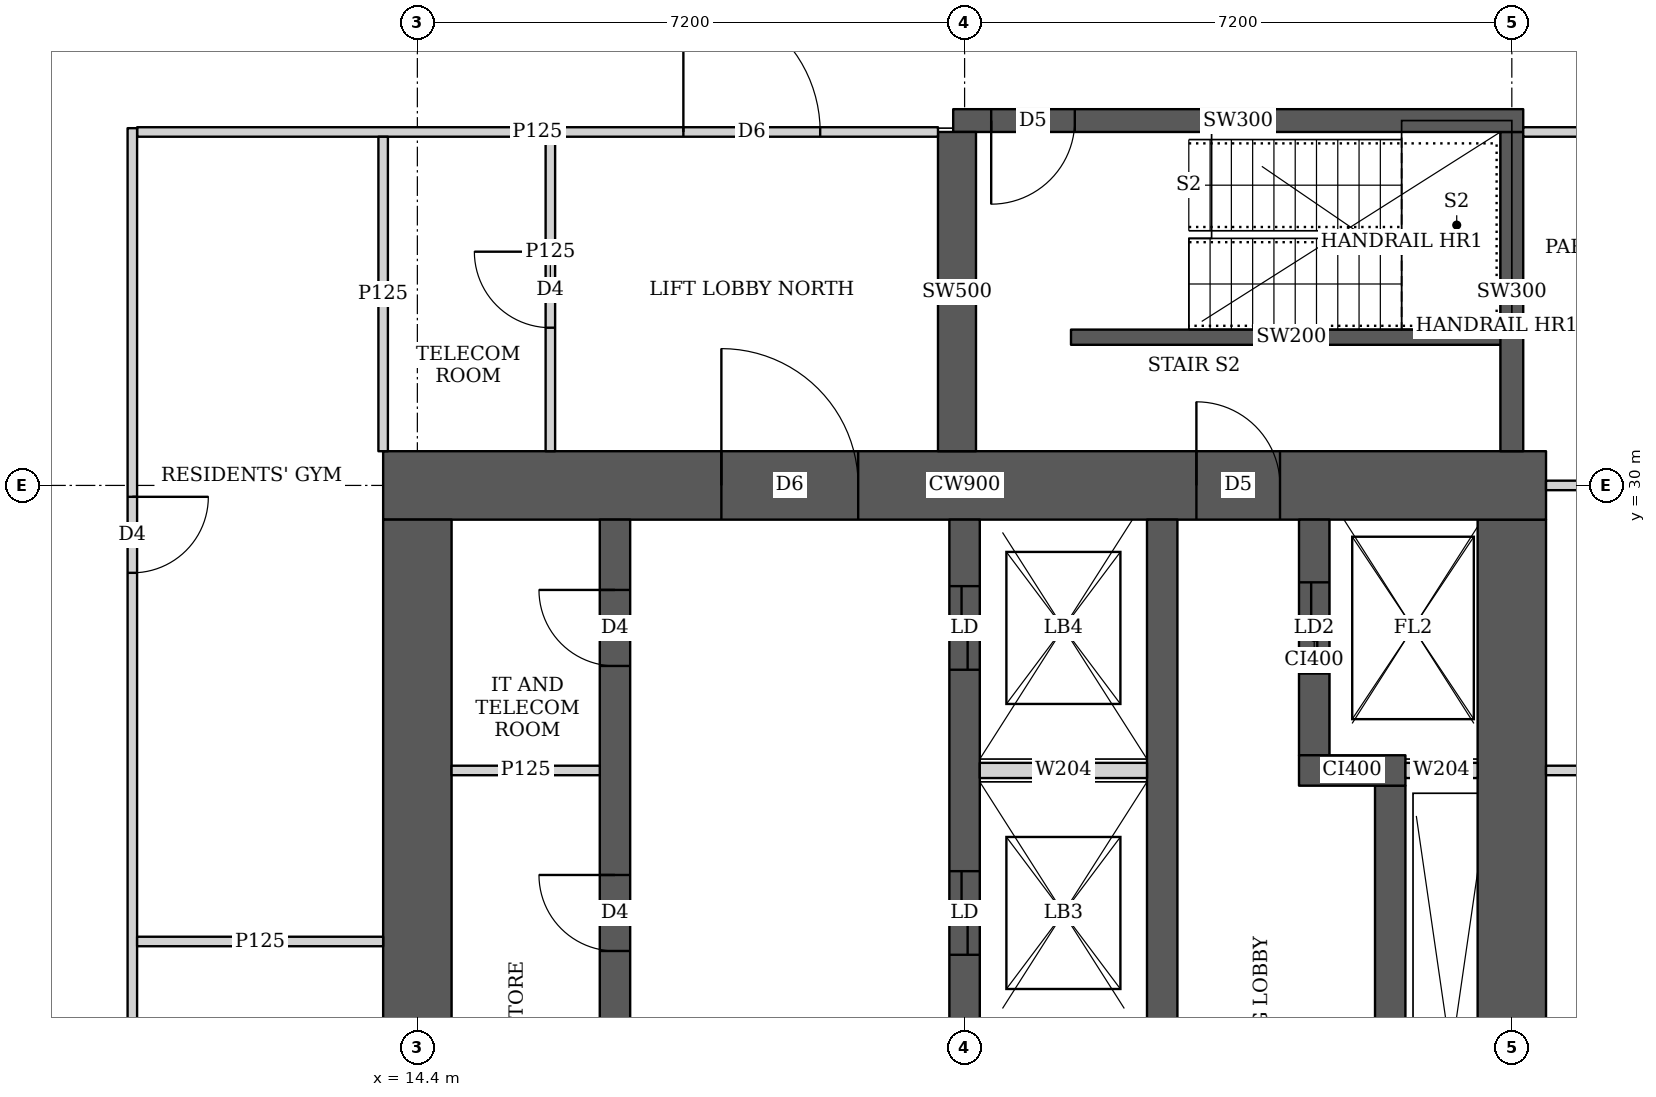
"""IFC4 building model, lengths in metres.
Left out: names, types, materials, properties, quantities, classifications, styles, units other than length and angle.
Written with IfcOpenShell. Run it as: python <this file> out.ifc"""

import sys

from ifc_helpers import new_model, si_unit, direction, frame, frame_2d, origin, place, context, subcontext, project, spatial, rectangle, extrude, element, fill, save


model = new_model("IFC4")
c1 = context("Model", 3, precision=1e-05, world=origin(), true_north=direction((0.0, 1.0)))
c2 = subcontext(c1, "Body", "Model", "MODEL_VIEW")
j1 = project(units=[si_unit("LENGTHUNIT", "METRE"), si_unit("PLANEANGLEUNIT", "RADIAN")], contexts=[c1])
p1 = place(None, origin())
s1 = spatial("IfcSite", under=j1, at=p1, CompositionType="ELEMENT")
p2 = place(p1, origin())
s2 = spatial("IfcBuilding", under=s1, at=p2, CompositionType="ELEMENT")
p3 = place(p2, frame((0.0, 0.0, 208.7)))
s3 = spatial("IfcBuildingStorey", under=s2, at=p3, CompositionType="ELEMENT", Elevation=208.7)
p4 = place(p3, frame((13.95, 30.0, 0.0), z_axis=(0.0, 0.0, 1.0), x_axis=(1.0, 0.0, 0.0)))
e1 = element("IfcWall", 1, at=p4, inside=s3, PredefinedType="SHEAR", context=c2, shape_type="SweptSolid", body=[
    extrude(rectangle(XDim=15.3, YDim=0.9, at=frame_2d((7.65, 0.0))), origin(), (0.0, 0.0, 1.0), 3.75),
])
p5 = place(p4, frame((4.45, 0.0, 0.0)))
e2 = element("IfcOpeningElement", 2, at=p5, cuts=e1, PredefinedType="OPENING", context=c2, shape_type="SweptSolid", body=[
    extrude(rectangle(XDim=1.8, YDim=2.1, at=frame_2d((0.9, 1.05))), frame((0.0, 0.46, 0.0), z_axis=(0.0, -1.0, 0.0), x_axis=(1.0, 0.0, 0.0)), (0.0, 0.0, 1.0), 0.92),
])
p6 = place(p4, frame((10.7, 0.0, 0.0)))
e3 = element("IfcOpeningElement", 3, at=p6, cuts=e1, PredefinedType="OPENING", context=c2, shape_type="SweptSolid", body=[
    extrude(rectangle(XDim=1.1, YDim=2.1, at=frame_2d((0.55, 1.05))), frame((0.0, 0.46, 0.0), z_axis=(0.0, -1.0, 0.0), x_axis=(1.0, 0.0, 0.0)), (0.0, 0.0, 1.0), 0.92),
])
for number, where, z_axis, x_axis in (
    (4, (14.4, 15.45, 0.0), (0.0, 0.0, 1.0), (0.0, 1.0, 0.0)),
    (5, (28.8, 15.45, 0.0), (0.0, 0.0, 1.0), (0.0, 1.0, 0.0)),
):
    element("IfcWall", number, at=place(p3, frame(where, z_axis=z_axis, x_axis=x_axis)), inside=s3, PredefinedType="SHEAR", context=c2, shape_type="SweptSolid", body=[
        extrude(rectangle(XDim=14.1, YDim=0.9, at=frame_2d((7.05, 0.0))), origin(), (0.0, 0.0, 1.0), 3.75),
    ])
p7 = place(p3, frame((17.0, 15.45, 0.0), z_axis=(0.0, 0.0, 1.0), x_axis=(0.0, 1.0, 0.0)))
e6 = element("IfcWall", 6, at=p7, inside=s3, PredefinedType="SHEAR", context=c2, shape_type="SweptSolid", body=[
    extrude(rectangle(XDim=14.1, YDim=0.4, at=frame_2d((7.05, 0.0))), origin(), (0.0, 0.0, 1.0), 3.75),
])
p8 = place(p7, frame((0.925, 0.0, 0.0)))
e7 = element("IfcOpeningElement", 7, at=p8, cuts=e6, PredefinedType="OPENING", context=c2, shape_type="SweptSolid", body=[
    extrude(rectangle(XDim=1.0, YDim=2.1, at=frame_2d((0.5, 1.05))), frame((0.0, 0.21, 0.0), z_axis=(0.0, -1.0, 0.0), x_axis=(1.0, 0.0, 0.0)), (0.0, 0.0, 1.0), 0.42),
])
p9 = place(p7, frame((4.675, 0.0, 0.0)))
e8 = element("IfcOpeningElement", 8, at=p9, cuts=e6, PredefinedType="OPENING", context=c2, shape_type="SweptSolid", body=[
    extrude(rectangle(XDim=1.0, YDim=2.1, at=frame_2d((0.5, 1.05))), frame((0.0, 0.21, 0.0), z_axis=(0.0, -1.0, 0.0), x_axis=(1.0, 0.0, 0.0)), (0.0, 0.0, 1.0), 0.42),
])
p10 = place(p7, frame((8.425, 0.0, 0.0)))
e9 = element("IfcOpeningElement", 9, at=p10, cuts=e6, PredefinedType="OPENING", context=c2, shape_type="SweptSolid", body=[
    extrude(rectangle(XDim=1.0, YDim=2.1, at=frame_2d((0.5, 1.05))), frame((0.0, 0.21, 0.0), z_axis=(0.0, -1.0, 0.0), x_axis=(1.0, 0.0, 0.0)), (0.0, 0.0, 1.0), 0.42),
])
p11 = place(p7, frame((12.175, 0.0, 0.0)))
e10 = element("IfcOpeningElement", 10, at=p11, cuts=e6, PredefinedType="OPENING", context=c2, shape_type="SweptSolid", body=[
    extrude(rectangle(XDim=1.0, YDim=2.1, at=frame_2d((0.5, 1.05))), frame((0.0, 0.21, 0.0), z_axis=(0.0, -1.0, 0.0), x_axis=(1.0, 0.0, 0.0)), (0.0, 0.0, 1.0), 0.42),
])
p12 = place(p3, frame((21.6, 15.45, 0.0), z_axis=(0.0, 0.0, 1.0), x_axis=(0.0, 1.0, 0.0)))
e11 = element("IfcWall", 11, at=p12, inside=s3, PredefinedType="SHEAR", context=c2, shape_type="SweptSolid", body=[
    extrude(rectangle(XDim=14.1, YDim=0.4, at=frame_2d((7.05, 0.0))), origin(), (0.0, 0.0, 1.0), 3.75),
])
p13 = place(p12, frame((0.875, 0.0, 0.0)))
e12 = element("IfcOpeningElement", 12, at=p13, cuts=e11, PredefinedType="OPENING", context=c2, shape_type="SweptSolid", body=[
    extrude(rectangle(XDim=1.1, YDim=2.1, at=frame_2d((0.55, 1.05))), frame((0.0, 0.21, 0.0), z_axis=(0.0, -1.0, 0.0), x_axis=(1.0, 0.0, 0.0)), (0.0, 0.0, 1.0), 0.42),
])
p14 = place(p12, frame((4.625, 0.0, 0.0)))
e13 = element("IfcOpeningElement", 13, at=p14, cuts=e11, PredefinedType="OPENING", context=c2, shape_type="SweptSolid", body=[
    extrude(rectangle(XDim=1.1, YDim=2.1, at=frame_2d((0.55, 1.05))), frame((0.0, 0.21, 0.0), z_axis=(0.0, -1.0, 0.0), x_axis=(1.0, 0.0, 0.0)), (0.0, 0.0, 1.0), 0.42),
])
p15 = place(p12, frame((8.375, 0.0, 0.0)))
e14 = element("IfcOpeningElement", 14, at=p15, cuts=e11, PredefinedType="OPENING", context=c2, shape_type="SweptSolid", body=[
    extrude(rectangle(XDim=1.1, YDim=2.1, at=frame_2d((0.55, 1.05))), frame((0.0, 0.21, 0.0), z_axis=(0.0, -1.0, 0.0), x_axis=(1.0, 0.0, 0.0)), (0.0, 0.0, 1.0), 0.42),
])
p16 = place(p12, frame((12.125, 0.0, 0.0)))
e15 = element("IfcOpeningElement", 15, at=p16, cuts=e11, PredefinedType="OPENING", context=c2, shape_type="SweptSolid", body=[
    extrude(rectangle(XDim=1.1, YDim=2.1, at=frame_2d((0.55, 1.05))), frame((0.0, 0.21, 0.0), z_axis=(0.0, -1.0, 0.0), x_axis=(1.0, 0.0, 0.0)), (0.0, 0.0, 1.0), 0.42),
])
p17 = place(p3, frame((24.2, 15.45, 0.0), z_axis=(0.0, 0.0, 1.0), x_axis=(0.0, 1.0, 0.0)))
e16 = element("IfcWall", 16, at=p17, inside=s3, PredefinedType="SHEAR", context=c2, shape_type="SweptSolid", body=[
    extrude(rectangle(XDim=14.1, YDim=0.4, at=frame_2d((7.05, 0.0))), origin(), (0.0, 0.0, 1.0), 3.75),
])
p18 = place(p3, frame((27.2, 18.95, 0.0), z_axis=(0.0, 0.0, 1.0), x_axis=(0.0, 1.0, 0.0)))
e17 = element("IfcWall", 17, at=p18, inside=s3, PredefinedType="SHEAR", context=c2, shape_type="SweptSolid", body=[
    extrude(rectangle(XDim=7.1, YDim=0.4, at=frame_2d((3.55, 0.0))), origin(), (0.0, 0.0, 1.0), 3.75),
])
p19 = place(p3, frame((26.0, 26.25, 0.0), z_axis=(0.0, 0.0, 1.0), x_axis=(1.0, 0.0, 0.0)))
e18 = element("IfcWall", 18, at=p19, inside=s3, PredefinedType="SHEAR", context=c2, shape_type="SweptSolid", body=[
    extrude(rectangle(XDim=1.4, YDim=0.4, at=frame_2d((0.7, 0.0))), origin(), (0.0, 0.0, 1.0), 3.75),
])
p20 = place(p3, frame((26.2, 26.45, 0.0), z_axis=(0.0, 0.0, 1.0), x_axis=(0.0, 1.0, 0.0)))
e19 = element("IfcWall", 19, at=p20, inside=s3, PredefinedType="SHEAR", context=c2, shape_type="SweptSolid", body=[
    extrude(rectangle(XDim=3.1, YDim=0.4, at=frame_2d((1.55, 0.0))), origin(), (0.0, 0.0, 1.0), 3.75),
])
p21 = place(p20, frame((1.075, 0.0, 0.0)))
e20 = element("IfcOpeningElement", 20, at=p21, cuts=e19, PredefinedType="OPENING", context=c2, shape_type="SweptSolid", body=[
    extrude(rectangle(XDim=1.2, YDim=2.1, at=frame_2d((0.6, 1.05))), frame((0.0, 0.21, 0.0), z_axis=(0.0, -1.0, 0.0), x_axis=(1.0, 0.0, 0.0)), (0.0, 0.0, 1.0), 0.42),
])
p22 = place(p3, frame((21.45, 34.8, 0.0), z_axis=(0.0, 0.0, 1.0), x_axis=(1.0, 0.0, 0.0)))
e21 = element("IfcWall", 21, at=p22, inside=s3, PredefinedType="SHEAR", context=c2, shape_type="SweptSolid", body=[
    extrude(rectangle(XDim=7.5, YDim=0.3, at=frame_2d((3.75, 0.0))), origin(), (0.0, 0.0, 1.0), 3.75),
])
p23 = place(p22, frame((0.5, 0.0, 0.0)))
e22 = element("IfcOpeningElement", 22, at=p23, cuts=e21, PredefinedType="OPENING", context=c2, shape_type="SweptSolid", body=[
    extrude(rectangle(XDim=1.1, YDim=2.1, at=frame_2d((0.55, 1.05))), frame((0.0, 0.16, 0.0), z_axis=(0.0, -1.0, 0.0), x_axis=(1.0, 0.0, 0.0)), (0.0, 0.0, 1.0), 0.32),
])
p24 = place(p3, frame((21.5, 30.45, 0.0), z_axis=(0.0, 0.0, 1.0), x_axis=(0.0, 1.0, 0.0)))
e23 = element("IfcWall", 23, at=p24, inside=s3, PredefinedType="SHEAR", context=c2, shape_type="SweptSolid", body=[
    extrude(rectangle(XDim=4.2, YDim=0.5, at=frame_2d((2.1, 0.0))), origin(), (0.0, 0.0, 1.0), 3.75),
])
p25 = place(p3, frame((28.8, 30.45, 0.0), z_axis=(0.0, 0.0, 1.0), x_axis=(0.0, 1.0, 0.0)))
e24 = element("IfcWall", 24, at=p25, inside=s3, PredefinedType="SHEAR", context=c2, shape_type="SweptSolid", body=[
    extrude(rectangle(XDim=4.2, YDim=0.3, at=frame_2d((2.1, 0.0))), origin(), (0.0, 0.0, 1.0), 3.75),
])
p26 = place(p3, frame((10.65, 10.3, 0.0), z_axis=(0.0, 0.0, 1.0), x_axis=(0.0, 1.0, 0.0)))
e25 = element("IfcWall", 25, at=p26, inside=s3, PredefinedType="PARTITIONING", context=c2, shape_type="SweptSolid", body=[
    extrude(rectangle(XDim=24.4, YDim=0.125, at=frame_2d((12.2, 0.0))), origin(), (0.0, 0.0, 1.0), 3.5),
])
p27 = place(p26, frame((1.55, 0.0, 0.0)))
e26 = element("IfcOpeningElement", 26, at=p27, cuts=e25, PredefinedType="OPENING", context=c2, shape_type="SweptSolid", body=[
    extrude(rectangle(XDim=1.0, YDim=2.1, at=frame_2d((0.5, 1.05))), frame((0.0, 0.073, 0.0), z_axis=(0.0, -1.0, 0.0), x_axis=(1.0, 0.0, 0.0)), (0.0, 0.0, 1.0), 0.145),
])
p28 = place(p26, frame((6.6, 0.0, 0.0)))
e27 = element("IfcOpeningElement", 27, at=p28, cuts=e25, PredefinedType="OPENING", context=c2, shape_type="SweptSolid", body=[
    extrude(rectangle(XDim=1.0, YDim=2.1, at=frame_2d((0.5, 1.05))), frame((0.0, 0.073, 0.0), z_axis=(0.0, -1.0, 0.0), x_axis=(1.0, 0.0, 0.0)), (0.0, 0.0, 1.0), 0.145),
])
p29 = place(p26, frame((11.4, 0.0, 0.0)))
e28 = element("IfcOpeningElement", 28, at=p29, cuts=e25, PredefinedType="OPENING", context=c2, shape_type="SweptSolid", body=[
    extrude(rectangle(XDim=1.0, YDim=2.1, at=frame_2d((0.5, 1.05))), frame((0.0, 0.073, 0.0), z_axis=(0.0, -1.0, 0.0), x_axis=(1.0, 0.0, 0.0)), (0.0, 0.0, 1.0), 0.145),
])
p30 = place(p26, frame((18.55, 0.0, 0.0)))
e29 = element("IfcOpeningElement", 29, at=p30, cuts=e25, PredefinedType="OPENING", context=c2, shape_type="SweptSolid", body=[
    extrude(rectangle(XDim=1.0, YDim=2.1, at=frame_2d((0.5, 1.05))), frame((0.0, 0.073, 0.0), z_axis=(0.0, -1.0, 0.0), x_axis=(1.0, 0.0, 0.0)), (0.0, 0.0, 1.0), 0.145),
])
p31 = place(p3, frame((10.713, 24.0, 0.0), z_axis=(0.0, 0.0, 1.0), x_axis=(1.0, 0.0, 0.0)))
e30 = element("IfcWall", 30, at=p31, inside=s3, PredefinedType="PARTITIONING", context=c2, shape_type="SweptSolid", body=[
    extrude(rectangle(XDim=3.237, YDim=0.125, at=frame_2d((1.619, 0.0))), origin(), (0.0, 0.0, 1.0), 3.5),
])
p32 = place(p3, frame((13.95, 30.45, 0.0), z_axis=(0.0, 0.0, 1.0), x_axis=(0.0, 1.0, 0.0)))
e31 = element("IfcWall", 31, at=p32, inside=s3, PredefinedType="PARTITIONING", context=c2, shape_type="SweptSolid", body=[
    extrude(rectangle(XDim=4.137, YDim=0.125, at=frame_2d((2.068, 0.0))), origin(), (0.0, 0.0, 1.0), 3.5),
])
p33 = place(p3, frame((10.713, 34.65, 0.0), z_axis=(0.0, 0.0, 1.0), x_axis=(1.0, 0.0, 0.0)))
e32 = element("IfcWall", 32, at=p33, inside=s3, PredefinedType="PARTITIONING", context=c2, shape_type="SweptSolid", body=[
    extrude(rectangle(XDim=10.537, YDim=0.125, at=frame_2d((5.269, 0.0))), origin(), (0.0, 0.0, 1.0), 3.5),
])
p34 = place(p33, frame((7.187, 0.0, 0.0)))
e33 = element("IfcOpeningElement", 33, at=p34, cuts=e32, PredefinedType="OPENING", context=c2, shape_type="SweptSolid", body=[
    extrude(rectangle(XDim=1.8, YDim=2.1, at=frame_2d((0.9, 1.05))), frame((0.0, 0.073, 0.0), z_axis=(0.0, -1.0, 0.0), x_axis=(1.0, 0.0, 0.0)), (0.0, 0.0, 1.0), 0.145),
])
p35 = place(p3, frame((16.15, 30.45, 0.0), z_axis=(0.0, 0.0, 1.0), x_axis=(0.0, 1.0, 0.0)))
e34 = element("IfcWall", 34, at=p35, inside=s3, PredefinedType="PARTITIONING", context=c2, shape_type="SweptSolid", body=[
    extrude(rectangle(XDim=4.137, YDim=0.125, at=frame_2d((2.068, 0.0))), origin(), (0.0, 0.0, 1.0), 3.5),
])
p36 = place(p35, frame((1.625, 0.0, 0.0)))
e35 = element("IfcOpeningElement", 35, at=p36, cuts=e34, PredefinedType="OPENING", context=c2, shape_type="SweptSolid", body=[
    extrude(rectangle(XDim=1.0, YDim=2.1, at=frame_2d((0.5, 1.05))), frame((0.0, 0.073, 0.0), z_axis=(0.0, -1.0, 0.0), x_axis=(1.0, 0.0, 0.0)), (0.0, 0.0, 1.0), 0.145),
])
p37 = place(p3, frame((28.95, 34.65, 0.0), z_axis=(0.0, 0.0, 1.0), x_axis=(1.0, 0.0, 0.0)))
e36 = element("IfcWall", 36, at=p37, inside=s3, PredefinedType="PARTITIONING", context=c2, shape_type="SweptSolid", body=[
    extrude(rectangle(XDim=4.381, YDim=0.125, at=frame_2d((2.19, 0.0))), origin(), (0.0, 0.0, 1.0), 3.5),
])
p38 = place(p3, frame((29.25, 26.25, 0.0), z_axis=(0.0, 0.0, 1.0), x_axis=(1.0, 0.0, 0.0)))
e37 = element("IfcWall", 37, at=p38, inside=s3, PredefinedType="PARTITIONING", context=c2, shape_type="SweptSolid", body=[
    extrude(rectangle(XDim=5.583, YDim=0.125, at=frame_2d((2.792, 0.0))), origin(), (0.0, 0.0, 1.0), 3.5),
])
p39 = place(p3, frame((29.25, 30.0, 0.0), z_axis=(0.0, 0.0, 1.0), x_axis=(1.0, 0.0, 0.0)))
e38 = element("IfcWall", 38, at=p39, inside=s3, PredefinedType="PARTITIONING", context=c2, shape_type="SweptSolid", body=[
    extrude(rectangle(XDim=3.049, YDim=0.125, at=frame_2d((1.524, 0.0))), origin(), (0.0, 0.0, 1.0), 3.5),
])
p40 = place(p3, frame((14.85, 26.25, 0.0), z_axis=(0.0, 0.0, 1.0), x_axis=(1.0, 0.0, 0.0)))
e39 = element("IfcWall", 39, at=p40, inside=s3, PredefinedType="PARTITIONING", context=c2, shape_type="SweptSolid", body=[
    extrude(rectangle(XDim=1.95, YDim=0.125, at=frame_2d((0.975, 0.0))), origin(), (0.0, 0.0, 1.0), 3.5),
])
p41 = place(p3, frame((23.0, 31.95, 0.0), z_axis=(0.0, 0.0, 1.0), x_axis=(1.0, 0.0, 0.0)))
e40 = element("IfcWall", 40, at=p41, inside=s3, PredefinedType="SHEAR", context=c2, shape_type="SweptSolid", body=[
    extrude(rectangle(XDim=5.8, YDim=0.2, at=frame_2d((2.9, 0.0))), origin(), (0.0, 0.0, 1.0), 3.75),
])
p42 = place(p3, frame((21.8, 26.25, 0.0), z_axis=(0.0, 0.0, 1.0), x_axis=(1.0, 0.0, 0.0)))
e41 = element("IfcWall", 41, at=p42, inside=s3, PredefinedType="SOLIDWALL", context=c2, shape_type="SweptSolid", body=[
    extrude(rectangle(XDim=2.2, YDim=0.2, at=frame_2d((1.1, 0.0))), origin(), (0.0, 0.0, 1.0), 3.5),
])
p43 = place(p3, frame((27.4, 26.25, 0.0), z_axis=(0.0, 0.0, 1.0), x_axis=(1.0, 0.0, 0.0)))
e42 = element("IfcWall", 42, at=p43, inside=s3, PredefinedType="SOLIDWALL", context=c2, shape_type="SweptSolid", body=[
    extrude(rectangle(XDim=0.95, YDim=0.2, at=frame_2d((0.475, 0.0))), origin(), (0.0, 0.0, 1.0), 3.5),
])
p44 = place(p30, origin())
e43 = element("IfcDoor", 43, at=p44, inside=s3, OperationType="SINGLE_SWING_LEFT", PredefinedType="DOOR", context=c2, shape_type="SweptSolid", body=[
    extrude(rectangle(XDim=1.0, YDim=2.1, at=frame_2d((0.5, 1.05))), frame((0.0, 0.025, 0.0), z_axis=(0.0, -1.0, 0.0), x_axis=(1.0, 0.0, 0.0)), (0.0, 0.0, 1.0), 0.05),
])
fill(e29, e43)
p45 = place(p36, origin())
e44 = element("IfcDoor", 44, at=p45, inside=s3, OperationType="SINGLE_SWING_RIGHT", PredefinedType="DOOR", context=c2, shape_type="SweptSolid", body=[
    extrude(rectangle(XDim=1.0, YDim=2.1, at=frame_2d((0.5, 1.05))), frame((0.0, 0.025, 0.0), z_axis=(0.0, -1.0, 0.0), x_axis=(1.0, 0.0, 0.0)), (0.0, 0.0, 1.0), 0.05),
])
fill(e35, e44)
p46 = place(p34, origin())
e45 = element("IfcDoor", 45, at=p46, inside=s3, OperationType="DOUBLE_DOOR_SINGLE_SWING", PredefinedType="DOOR", context=c2, shape_type="SweptSolid", body=[
    extrude(rectangle(XDim=1.8, YDim=2.1, at=frame_2d((0.9, 1.05))), frame((0.0, 0.025, 0.0), z_axis=(0.0, -1.0, 0.0), x_axis=(1.0, 0.0, 0.0)), (0.0, 0.0, 1.0), 0.05),
])
fill(e33, e45)
p47 = place(p10, origin())
e46 = element("IfcDoor", 46, at=p47, inside=s3, OperationType="SINGLE_SWING_RIGHT", PredefinedType="DOOR", context=c2, shape_type="SweptSolid", body=[
    extrude(rectangle(XDim=1.0, YDim=2.1, at=frame_2d((0.5, 1.05))), frame((0.0, 0.025, 0.0), z_axis=(0.0, -1.0, 0.0), x_axis=(1.0, 0.0, 0.0)), (0.0, 0.0, 1.0), 0.05),
])
fill(e9, e46)
p48 = place(p11, origin())
e47 = element("IfcDoor", 47, at=p48, inside=s3, OperationType="SINGLE_SWING_RIGHT", PredefinedType="DOOR", context=c2, shape_type="SweptSolid", body=[
    extrude(rectangle(XDim=1.0, YDim=2.1, at=frame_2d((0.5, 1.05))), frame((0.0, 0.025, 0.0), z_axis=(0.0, -1.0, 0.0), x_axis=(1.0, 0.0, 0.0)), (0.0, 0.0, 1.0), 0.05),
])
fill(e10, e47)
p49 = place(p5, origin())
e48 = element("IfcDoor", 48, at=p49, inside=s3, OperationType="DOUBLE_DOOR_SINGLE_SWING", PredefinedType="DOOR", context=c2, shape_type="SweptSolid", body=[
    extrude(rectangle(XDim=1.8, YDim=2.1, at=frame_2d((0.9, 1.05))), frame((0.0, 0.025, 0.0), z_axis=(0.0, -1.0, 0.0), x_axis=(1.0, 0.0, 0.0)), (0.0, 0.0, 1.0), 0.05),
])
fill(e2, e48)
p50 = place(p6, origin())
e49 = element("IfcDoor", 49, at=p50, inside=s3, OperationType="SINGLE_SWING_LEFT", PredefinedType="DOOR", context=c2, shape_type="SweptSolid", body=[
    extrude(rectangle(XDim=1.1, YDim=2.1, at=frame_2d((0.55, 1.05))), frame((0.0, 0.025, 0.0), z_axis=(0.0, -1.0, 0.0), x_axis=(1.0, 0.0, 0.0)), (0.0, 0.0, 1.0), 0.05),
])
fill(e3, e49)
p51 = place(p21, origin())
e50 = element("IfcDoor", 50, at=p51, inside=s3, OperationType="DOUBLE_DOOR_SLIDING", PredefinedType="DOOR", context=c2, shape_type="SweptSolid", body=[
    extrude(rectangle(XDim=1.2, YDim=2.1, at=frame_2d((0.6, 1.05))), frame((0.0, 0.025, 0.0), z_axis=(0.0, -1.0, 0.0), x_axis=(1.0, 0.0, 0.0)), (0.0, 0.0, 1.0), 0.05),
])
fill(e20, e50)
p52 = place(p15, origin())
e51 = element("IfcDoor", 51, at=p52, inside=s3, OperationType="DOUBLE_DOOR_SLIDING", PredefinedType="DOOR", context=c2, shape_type="SweptSolid", body=[
    extrude(rectangle(XDim=1.1, YDim=2.1, at=frame_2d((0.55, 1.05))), frame((0.0, 0.025, 0.0), z_axis=(0.0, -1.0, 0.0), x_axis=(1.0, 0.0, 0.0)), (0.0, 0.0, 1.0), 0.05),
])
fill(e14, e51)
p53 = place(p16, origin())
e52 = element("IfcDoor", 52, at=p53, inside=s3, OperationType="DOUBLE_DOOR_SLIDING", PredefinedType="DOOR", context=c2, shape_type="SweptSolid", body=[
    extrude(rectangle(XDim=1.1, YDim=2.1, at=frame_2d((0.55, 1.05))), frame((0.0, 0.025, 0.0), z_axis=(0.0, -1.0, 0.0), x_axis=(1.0, 0.0, 0.0)), (0.0, 0.0, 1.0), 0.05),
])
fill(e15, e52)
p54 = place(p23, origin())
e53 = element("IfcDoor", 53, at=p54, inside=s3, OperationType="SINGLE_SWING_RIGHT", PredefinedType="DOOR", context=c2, shape_type="SweptSolid", body=[
    extrude(rectangle(XDim=1.1, YDim=2.1, at=frame_2d((0.55, 1.05))), frame((0.0, 0.025, 0.0), z_axis=(0.0, -1.0, 0.0), x_axis=(1.0, 0.0, 0.0)), (0.0, 0.0, 1.0), 0.05),
])
fill(e22, e53)
save(model, sys.argv[1])
